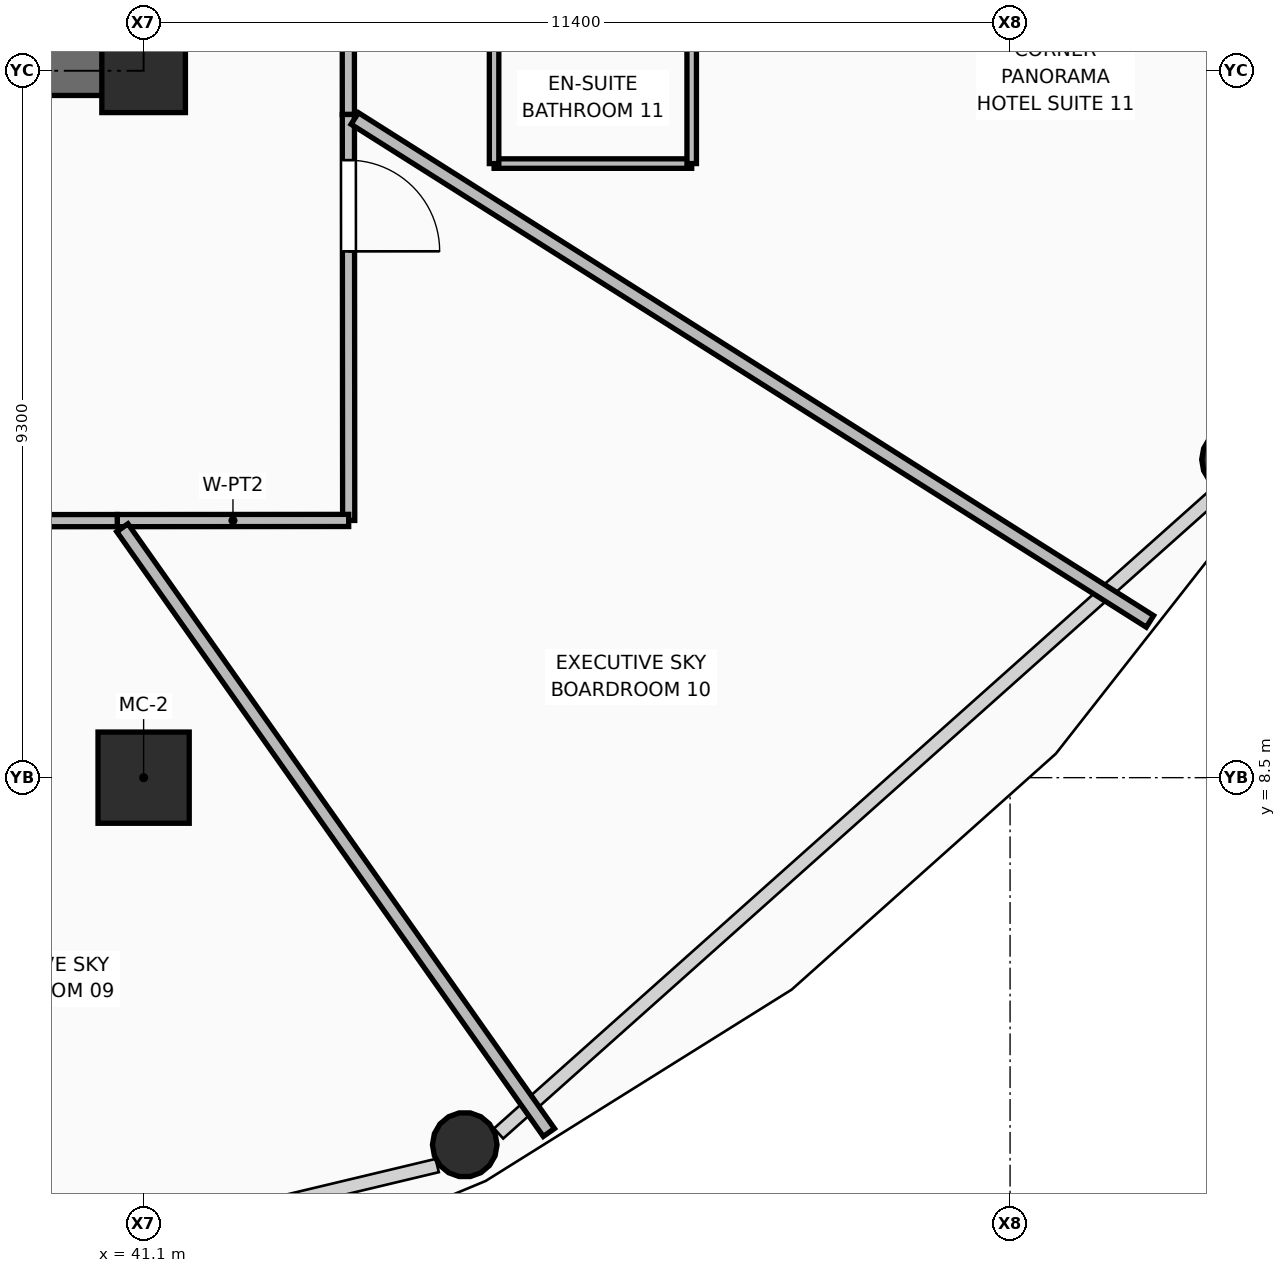
"""IFC4 building model, lengths in metres.
Left out: names, types, materials, properties, quantities, classifications, styles, units other than length and angle.
Written with IfcOpenShell. Run it as: python <this file> out.ifc"""

import sys

from ifc_helpers import new_model, si_unit, direction, frame, frame_2d, origin, origin_2d, place, context, subcontext, project, spatial, rectangle, hollow_rectangle, hollow_circle, extrude, element, fill, save


model = new_model("IFC4")
c1 = context("Model", 3, precision=1e-05, world=origin(), true_north=direction((0.0, 1.0)))
c2 = subcontext(c1, "Body", "Model", "MODEL_VIEW")
j1 = project(units=[si_unit("LENGTHUNIT", "METRE"), si_unit("PLANEANGLEUNIT", "RADIAN")], contexts=[c1])
p1 = place(None, origin())
s1 = spatial("IfcSite", under=j1, at=p1, CompositionType="ELEMENT")
p2 = place(p1, origin())
s2 = spatial("IfcBuilding", under=s1, at=p2, CompositionType="ELEMENT")
p3 = place(p2, frame((0.0, 0.0, 75.75)))
s3 = spatial("IfcBuildingStorey", under=s2, at=p3, CompositionType="ELEMENT", Elevation=75.75)
p4 = place(p3, frame((41.1, 17.8, 0.0), z_axis=(0.0, 0.0, 1.0), x_axis=(1.0, 0.0, 0.0)))
e1 = element("IfcColumn", 1, at=p4, inside=s3, PredefinedType="COLUMN", context=c2, shape_type="SweptSolid", body=[
    extrude(rectangle(XDim=1.1, YDim=1.1, at=origin_2d()), origin(), (0.0, 0.0, 1.0), 3.75),
])
p5 = place(p3, frame((41.1, 8.5, 0.0), z_axis=(0.0, 0.0, 1.0), x_axis=(1.0, 0.0, 0.0)))
e2 = element("IfcColumn", 2, at=p5, inside=s3, PredefinedType="COLUMN", context=c2, shape_type="SweptSolid", body=[
    extrude(hollow_rectangle(XDim=1.2, YDim=1.2, WallThickness=0.045, at=origin_2d()), origin(), (0.0, 0.0, 1.0), 3.75),
])
p6 = place(p3, frame((45.325, 3.671, 0.0), z_axis=(-0.020978592197, 0.032527068032, 0.999250663505), x_axis=(-0.840374471714, -0.542006224404, 0.0)))
e3 = element("IfcColumn", 3, at=p6, inside=s3, PredefinedType="COLUMN", context=c2, shape_type="SweptSolid", body=[
    extrude(hollow_circle(Radius=0.425, WallThickness=0.04, at=origin_2d()), origin(), (0.0, 0.0, 1.0), 3.573),
])
p7 = place(p3, frame((55.446, 12.685, 0.0), z_axis=(-0.03641885619, 0.018721888548, 0.999161227132), x_axis=(-0.457197196227, -0.889365348865, 0.0)))
e4 = element("IfcColumn", 4, at=p7, inside=s3, PredefinedType="COLUMN", context=c2, shape_type="SweptSolid", body=[
    extrude(hollow_circle(Radius=0.425, WallThickness=0.04, at=origin_2d()), origin(), (0.0, 0.0, 1.0), 3.573),
])
p8 = place(p3, frame((34.95, 17.8, 0.0), z_axis=(0.0, 0.0, 1.0), x_axis=(1.0, 0.0, 0.0)))
e5 = element("IfcWall", 5, at=p8, inside=s3, PredefinedType="SHEAR", context=c2, shape_type="SweptSolid", body=[
    extrude(rectangle(XDim=6.475, YDim=0.65, at=frame_2d((3.238, 0.0))), origin(), (0.0, 0.0, 1.0), 3.57),
])
p9 = place(p3, frame((43.79, 23.539, 0.0), z_axis=(0.0, 0.0, 1.0), x_axis=(0.000618668198, -0.999999808625, 0.0)))
e6 = element("IfcWall", 6, at=p9, inside=s3, PredefinedType="PARTITIONING", context=c2, shape_type="SweptSolid", body=[
    extrude(rectangle(XDim=6.314, YDim=0.16, at=frame_2d((3.157, 0.0))), origin(), (0.0, 0.0, 1.0), 2.928),
])
p10 = place(p9, frame((2.257, 0.0, 0.0)))
e7 = element("IfcOpeningElement", 7, at=p10, cuts=e6, PredefinedType="OPENING", context=c2, shape_type="SweptSolid", body=[
    extrude(rectangle(XDim=1.2, YDim=2.1, at=frame_2d((0.6, 1.05))), frame((0.0, 0.09, 0.0), z_axis=(0.0, -1.0, 0.0), x_axis=(1.0, 0.0, 0.0)), (0.0, 0.0, 1.0), 0.18),
])
p11 = place(p3, frame((43.794, 17.225, 0.0), z_axis=(0.0, 0.0, 1.0), x_axis=(0.000777071576, -0.99999969808, 0.0)))
e8 = element("IfcWall", 8, at=p11, inside=s3, PredefinedType="PARTITIONING", context=c2, shape_type="SweptSolid", body=[
    extrude(rectangle(XDim=5.341, YDim=0.16, at=frame_2d((2.67, 0.0))), origin(), (0.0, 0.0, 1.0), 2.928),
])
p12 = place(p11, frame((0.601, 0.0, 0.0)))
e9 = element("IfcOpeningElement", 9, at=p12, cuts=e8, PredefinedType="OPENING", context=c2, shape_type="SweptSolid", body=[
    extrude(rectangle(XDim=1.2, YDim=2.1, at=frame_2d((0.6, 1.05))), frame((0.0, 0.09, 0.0), z_axis=(0.0, -1.0, 0.0), x_axis=(1.0, 0.0, 0.0)), (0.0, 0.0, 1.0), 0.18),
])
p13 = place(p3, frame((43.798, 11.884, 0.0), z_axis=(0.0, 0.0, 1.0), x_axis=(-0.999999794312, -0.000641385261, 0.0)))
e10 = element("IfcWall", 10, at=p13, inside=s3, PredefinedType="PARTITIONING", context=c2, shape_type="SweptSolid", body=[
    extrude(rectangle(XDim=3.045, YDim=0.16, at=frame_2d((1.522, 0.0))), origin(), (0.0, 0.0, 1.0), 2.928),
])
p14 = place(p3, frame((40.753, 11.882, 0.0), z_axis=(0.0, 0.0, 1.0), x_axis=(-0.999999706426, -0.00076625534, 0.0)))
e11 = element("IfcWall", 11, at=p14, inside=s3, PredefinedType="PARTITIONING", context=c2, shape_type="SweptSolid", body=[
    extrude(rectangle(XDim=6.691, YDim=0.16, at=frame_2d((3.345, 0.0))), origin(), (0.0, 0.0, 1.0), 3.55),
])
p15 = place(p14, frame((2.672, 0.0, 0.0)))
e12 = element("IfcOpeningElement", 12, at=p15, cuts=e11, PredefinedType="OPENING", context=c2, shape_type="SweptSolid", body=[
    extrude(rectangle(XDim=1.2, YDim=2.1, at=frame_2d((0.6, 1.05))), frame((0.0, 0.09, 0.0), z_axis=(0.0, -1.0, 0.0), x_axis=(1.0, 0.0, 0.0)), (0.0, 0.0, 1.0), 0.18),
])
p16 = place(p3, frame((40.82, 11.788, 0.0), z_axis=(0.0, 0.0, 1.0), x_axis=(0.576393717645, -0.817172125234, 0.0)))
e13 = element("IfcWall", 13, at=p16, inside=s3, PredefinedType="PARTITIONING", context=c2, shape_type="SweptSolid", body=[
    extrude(rectangle(XDim=9.736, YDim=0.18, at=frame_2d((4.868, 0.0))), origin(), (0.0, 0.0, 1.0), 2.775),
])
p17 = place(p3, frame((43.878, 17.172, 0.0), z_axis=(0.0, 0.0, 1.0), x_axis=(0.845177570146, -0.534485617132, 0.0)))
e14 = element("IfcWall", 14, at=p17, inside=s3, PredefinedType="PARTITIONING", context=c2, shape_type="SweptSolid", body=[
    extrude(rectangle(XDim=12.379, YDim=0.18, at=frame_2d((6.189, 0.0))), origin(), (0.0, 0.0, 1.0), 2.775),
])
p18 = place(p3, frame((45.711, 16.579, 0.0), z_axis=(0.0, 0.0, 1.0), x_axis=(1.0, 0.0, 0.0)))
e15 = element("IfcWall", 15, at=p18, inside=s3, PredefinedType="PARTITIONING", context=c2, shape_type="SweptSolid", body=[
    extrude(rectangle(XDim=2.6, YDim=0.125, at=frame_2d((1.3, 0.0))), origin(), (0.0, 0.0, 1.0), 3.55),
])
for number, where, z_axis, x_axis in (
    (16, (45.711, 16.579, 0.0), (0.0, 0.0, 1.0), (0.0, 1.0, 0.0)),
    (17, (48.311, 16.579, 0.0), (0.0, 0.0, 1.0), (0.0, 1.0, 0.0)),
):
    element("IfcWall", number, at=place(p3, frame(where, z_axis=z_axis, x_axis=x_axis)), inside=s3, PredefinedType="PARTITIONING", context=c2, shape_type="SweptSolid", body=[
        extrude(rectangle(XDim=2.5, YDim=0.125, at=frame_2d((1.25, 0.0))), origin(), (0.0, 0.0, 1.0), 3.55),
    ])
p19 = place(p12, origin())
e18 = element("IfcDoor", 18, at=p19, inside=s3, OperationType="SINGLE_SWING_RIGHT", PredefinedType="DOOR", context=c2, shape_type="SweptSolid", body=[
    extrude(rectangle(XDim=1.2, YDim=2.1, at=frame_2d((0.6, 1.05))), frame((0.0, 0.025, 0.0), z_axis=(0.0, -1.0, 0.0), x_axis=(1.0, 0.0, 0.0)), (0.0, 0.0, 1.0), 0.05),
])
fill(e9, e18)
save(model, sys.argv[1])
